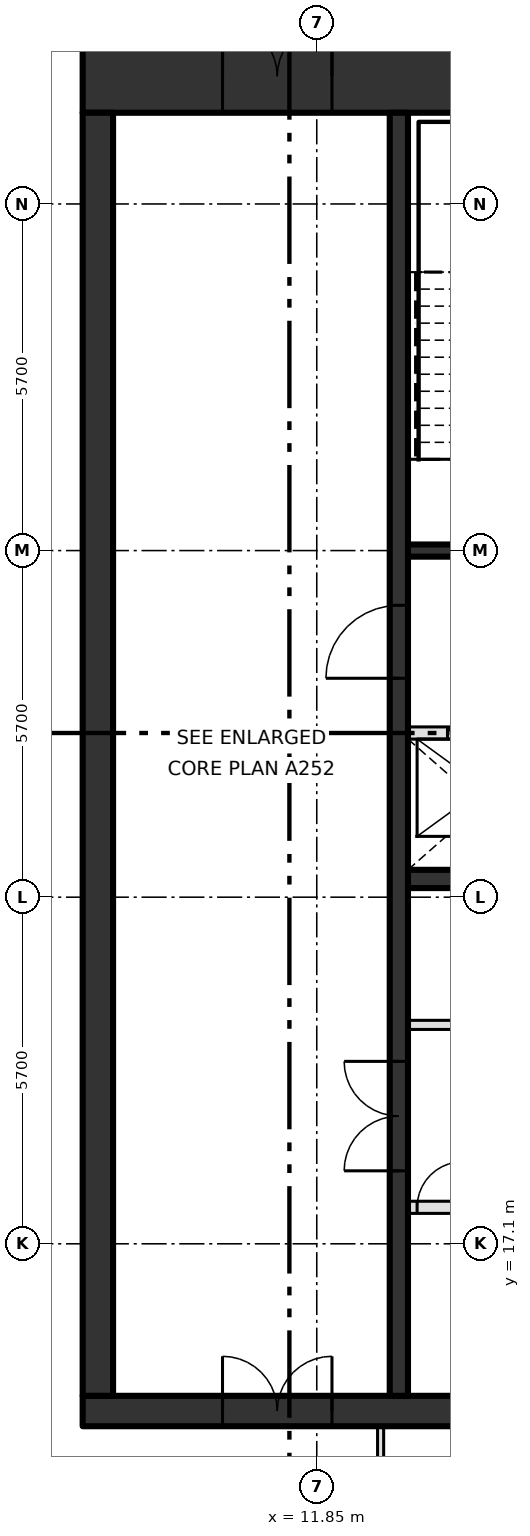
"""IFC4 building model, lengths in metres.
Left out: names, types, materials, properties, quantities, classifications, styles, units other than length and angle.
Written with IfcOpenShell. Run it as: python <this file> out.ifc"""

import sys

from ifc_helpers import new_model, si_unit, direction, frame, frame_2d, origin, place, context, subcontext, project, spatial, rectangle, extrude, element, fill, save


model = new_model("IFC4")
c1 = context("Model", 3, precision=1e-05, world=origin(), true_north=direction((0.0, 1.0)))
c2 = subcontext(c1, "Body", "Model", "MODEL_VIEW")
j1 = project(units=[si_unit("LENGTHUNIT", "METRE"), si_unit("PLANEANGLEUNIT", "RADIAN")], contexts=[c1])
p1 = place(None, origin())
s1 = spatial("IfcSite", under=j1, at=p1, CompositionType="ELEMENT")
p2 = place(p1, origin())
s2 = spatial("IfcBuilding", under=s1, at=p2, CompositionType="ELEMENT")
p3 = place(p2, frame((0.0, 0.0, 391.8)))
s3 = spatial("IfcBuildingStorey", under=s2, at=p3, CompositionType="ELEMENT", Elevation=391.8)
p4 = place(p3, frame((8.0, 14.35, -0.3), z_axis=(0.0, 0.0, 1.0), x_axis=(1.0, 0.0, 0.0)))
e1 = element("IfcWall", 1, at=p4, inside=s3, PredefinedType="SHEAR", context=c2, shape_type="SweptSolid", body=[
    extrude(rectangle(XDim=22.8, YDim=0.5, at=frame_2d((11.4, 0.0))), origin(), (0.0, 0.0, 1.0), 4.2),
])
p5 = place(p4, frame((2.3, 0.0, 0.3)))
e2 = element("IfcOpeningElement", 2, at=p5, cuts=e1, PredefinedType="OPENING", context=c2, shape_type="SweptSolid", body=[
    extrude(rectangle(XDim=1.8, YDim=2.1, at=frame_2d((0.9, 1.05))), frame((0.0, 0.26, 0.0), z_axis=(0.0, -1.0, 0.0), x_axis=(1.0, 0.0, 0.0)), (0.0, 0.0, 1.0), 0.52),
])
p6 = place(p3, frame((8.0, 36.3, -0.3), z_axis=(0.0, 0.0, 1.0), x_axis=(1.0, 0.0, 0.0)))
e3 = element("IfcWall", 3, at=p6, inside=s3, PredefinedType="SHEAR", context=c2, shape_type="SweptSolid", body=[
    extrude(rectangle(XDim=22.8, YDim=1.2, at=frame_2d((11.4, 0.0))), origin(), (0.0, 0.0, 1.0), 4.2),
])
p7 = place(p6, frame((2.3, 0.0, 0.3)))
e4 = element("IfcOpeningElement", 4, at=p7, cuts=e3, PredefinedType="OPENING", context=c2, shape_type="SweptSolid", body=[
    extrude(rectangle(XDim=1.8, YDim=2.1, at=frame_2d((0.9, 1.05))), frame((0.0, 0.61, 0.0), z_axis=(0.0, -1.0, 0.0), x_axis=(1.0, 0.0, 0.0)), (0.0, 0.0, 1.0), 1.22),
])
p8 = place(p3, frame((8.25, 14.6, -0.3), z_axis=(0.0, 0.0, 1.0), x_axis=(0.0, 1.0, 0.0)))
e5 = element("IfcWall", 5, at=p8, inside=s3, PredefinedType="SHEAR", context=c2, shape_type="SweptSolid", body=[
    extrude(rectangle(XDim=21.1, YDim=0.5, at=frame_2d((10.55, 0.0))), origin(), (0.0, 0.0, 1.0), 4.2),
])
p9 = place(p3, frame((13.35, 17.7, 0.0), z_axis=(0.0, 0.0, 1.0), x_axis=(1.0, 0.0, 0.0)))
e6 = element("IfcWall", 6, at=p9, inside=s3, PredefinedType="SOLIDWALL", context=c2, shape_type="SweptSolid", body=[
    extrude(rectangle(XDim=13.425, YDim=0.2, at=frame_2d((6.712, 0.0))), origin(), (0.0, 0.0, 1.0), 3.9),
])
p10 = place(p9, frame((2.0, 0.0, 0.0)))
e7 = element("IfcOpeningElement", 7, at=p10, cuts=e6, PredefinedType="OPENING", context=c2, shape_type="SweptSolid", body=[
    extrude(rectangle(XDim=1.1, YDim=2.1, at=frame_2d((0.55, 1.05))), frame((0.0, 0.11, 0.0), z_axis=(0.0, -1.0, 0.0), x_axis=(1.0, 0.0, 0.0)), (0.0, 0.0, 1.0), 0.22),
])
p11 = place(p9, frame((4.7, 0.0, 0.0)))
e8 = element("IfcOpeningElement", 8, at=p11, cuts=e6, PredefinedType="OPENING", context=c2, shape_type="SweptSolid", body=[
    extrude(rectangle(XDim=1.1, YDim=2.1, at=frame_2d((0.55, 1.05))), frame((0.0, 0.11, 0.0), z_axis=(0.0, -1.0, 0.0), x_axis=(1.0, 0.0, 0.0)), (0.0, 0.0, 1.0), 0.22),
])
p12 = place(p9, frame((7.4, 0.0, 0.0)))
e9 = element("IfcOpeningElement", 9, at=p12, cuts=e6, PredefinedType="OPENING", context=c2, shape_type="SweptSolid", body=[
    extrude(rectangle(XDim=1.1, YDim=2.1, at=frame_2d((0.55, 1.05))), frame((0.0, 0.11, 0.0), z_axis=(0.0, -1.0, 0.0), x_axis=(1.0, 0.0, 0.0)), (0.0, 0.0, 1.0), 0.22),
])
p13 = place(p9, frame((10.1, 0.0, 0.0)))
e10 = element("IfcOpeningElement", 10, at=p13, cuts=e6, PredefinedType="OPENING", context=c2, shape_type="SweptSolid", body=[
    extrude(rectangle(XDim=1.1, YDim=2.1, at=frame_2d((0.55, 1.05))), frame((0.0, 0.11, 0.0), z_axis=(0.0, -1.0, 0.0), x_axis=(1.0, 0.0, 0.0)), (0.0, 0.0, 1.0), 0.22),
])
p14 = place(p9, frame((0.15, 0.0, 0.0)))
e11 = element("IfcOpeningElement", 11, at=p14, cuts=e6, PredefinedType="OPENING", context=c2, shape_type="SweptSolid", body=[
    extrude(rectangle(XDim=0.75, YDim=2.1, at=frame_2d((0.375, 1.05))), frame((0.0, 0.11, 0.0), z_axis=(0.0, -1.0, 0.0), x_axis=(1.0, 0.0, 0.0)), (0.0, 0.0, 1.0), 0.22),
])
p15 = place(p9, frame((12.3, 0.0, 0.0)))
e12 = element("IfcOpeningElement", 12, at=p15, cuts=e6, PredefinedType="OPENING", context=c2, shape_type="SweptSolid", body=[
    extrude(rectangle(XDim=0.75, YDim=2.1, at=frame_2d((0.375, 1.05))), frame((0.0, 0.11, 0.0), z_axis=(0.0, -1.0, 0.0), x_axis=(1.0, 0.0, 0.0)), (0.0, 0.0, 1.0), 0.22),
])
p16 = place(p3, frame((13.35, 20.7, 0.0), z_axis=(0.0, 0.0, 1.0), x_axis=(1.0, 0.0, 0.0)))
e13 = element("IfcWall", 13, at=p16, inside=s3, PredefinedType="PARTITIONING", context=c2, shape_type="SweptSolid", body=[
    extrude(rectangle(XDim=13.425, YDim=0.15, at=frame_2d((6.712, 0.0))), origin(), (0.0, 0.0, 1.0), 3.9),
])
p17 = place(p16, frame((0.75, 0.0, 0.0)))
e14 = element("IfcOpeningElement", 14, at=p17, cuts=e13, PredefinedType="OPENING", context=c2, shape_type="SweptSolid", body=[
    extrude(rectangle(XDim=0.9, YDim=2.1, at=frame_2d((0.45, 1.05))), frame((0.0, 0.085, 0.0), z_axis=(0.0, -1.0, 0.0), x_axis=(1.0, 0.0, 0.0)), (0.0, 0.0, 1.0), 0.17),
])
p18 = place(p16, frame((7.5, 0.0, 0.0)))
e15 = element("IfcOpeningElement", 15, at=p18, cuts=e13, PredefinedType="OPENING", context=c2, shape_type="SweptSolid", body=[
    extrude(rectangle(XDim=0.9, YDim=2.1, at=frame_2d((0.45, 1.05))), frame((0.0, 0.085, 0.0), z_axis=(0.0, -1.0, 0.0), x_axis=(1.0, 0.0, 0.0)), (0.0, 0.0, 1.0), 0.17),
])
p19 = place(p3, frame((13.35, 23.1, 0.0), z_axis=(0.0, 0.0, 1.0), x_axis=(1.0, 0.0, 0.0)))
e16 = element("IfcWall", 16, at=p19, inside=s3, PredefinedType="SHEAR", context=c2, shape_type="SweptSolid", body=[
    extrude(rectangle(XDim=16.95, YDim=0.3, at=frame_2d((8.475, 0.0))), origin(), (0.0, 0.0, 1.0), 3.9),
])
p20 = place(p3, frame((13.35, 25.5, 0.0), z_axis=(0.0, 0.0, 1.0), x_axis=(1.0, 0.0, 0.0)))
e17 = element("IfcWall", 17, at=p20, inside=s3, PredefinedType="SOLIDWALL", context=c2, shape_type="SweptSolid", body=[
    extrude(rectangle(XDim=16.95, YDim=0.2, at=frame_2d((8.475, 0.0))), origin(), (0.0, 0.0, 1.0), 3.9),
])
p21 = place(p20, frame((0.65, 0.0, 0.0)))
e18 = element("IfcOpeningElement", 18, at=p21, cuts=e17, PredefinedType="OPENING", context=c2, shape_type="SweptSolid", body=[
    extrude(rectangle(XDim=1.1, YDim=2.1, at=frame_2d((0.55, 1.05))), frame((0.0, 0.11, 0.0), z_axis=(0.0, -1.0, 0.0), x_axis=(1.0, 0.0, 0.0)), (0.0, 0.0, 1.0), 0.22),
])
p22 = place(p20, frame((3.35, 0.0, 0.0)))
e19 = element("IfcOpeningElement", 19, at=p22, cuts=e17, PredefinedType="OPENING", context=c2, shape_type="SweptSolid", body=[
    extrude(rectangle(XDim=1.1, YDim=2.1, at=frame_2d((0.55, 1.05))), frame((0.0, 0.11, 0.0), z_axis=(0.0, -1.0, 0.0), x_axis=(1.0, 0.0, 0.0)), (0.0, 0.0, 1.0), 0.22),
])
p23 = place(p20, frame((6.05, 0.0, 0.0)))
e20 = element("IfcOpeningElement", 20, at=p23, cuts=e17, PredefinedType="OPENING", context=c2, shape_type="SweptSolid", body=[
    extrude(rectangle(XDim=1.1, YDim=2.1, at=frame_2d((0.55, 1.05))), frame((0.0, 0.11, 0.0), z_axis=(0.0, -1.0, 0.0), x_axis=(1.0, 0.0, 0.0)), (0.0, 0.0, 1.0), 0.22),
])
p24 = place(p20, frame((8.75, 0.0, 0.0)))
e21 = element("IfcOpeningElement", 21, at=p24, cuts=e17, PredefinedType="OPENING", context=c2, shape_type="SweptSolid", body=[
    extrude(rectangle(XDim=1.1, YDim=2.1, at=frame_2d((0.55, 1.05))), frame((0.0, 0.11, 0.0), z_axis=(0.0, -1.0, 0.0), x_axis=(1.0, 0.0, 0.0)), (0.0, 0.0, 1.0), 0.22),
])
p25 = place(p20, frame((13.0, 0.0, 0.0)))
e22 = element("IfcOpeningElement", 22, at=p25, cuts=e17, PredefinedType="OPENING", context=c2, shape_type="SweptSolid", body=[
    extrude(rectangle(XDim=0.9, YDim=2.1, at=frame_2d((0.45, 1.05))), frame((0.0, 0.11, 0.0), z_axis=(0.0, -1.0, 0.0), x_axis=(1.0, 0.0, 0.0)), (0.0, 0.0, 1.0), 0.22),
])
p26 = place(p3, frame((13.35, 28.5, 0.0), z_axis=(0.0, 0.0, 1.0), x_axis=(1.0, 0.0, 0.0)))
e23 = element("IfcWall", 23, at=p26, inside=s3, PredefinedType="SOLIDWALL", context=c2, shape_type="SweptSolid", body=[
    extrude(rectangle(XDim=6.75, YDim=0.2, at=frame_2d((3.375, 0.0))), origin(), (0.0, 0.0, 1.0), 3.9),
])
p27 = place(p26, frame((0.95, 0.0, 0.0)))
e24 = element("IfcOpeningElement", 24, at=p27, cuts=e23, PredefinedType="OPENING", context=c2, shape_type="SweptSolid", body=[
    extrude(rectangle(XDim=1.2, YDim=2.1, at=frame_2d((0.6, 1.05))), frame((0.0, 0.11, 0.0), z_axis=(0.0, -1.0, 0.0), x_axis=(1.0, 0.0, 0.0)), (0.0, 0.0, 1.0), 0.22),
])
p28 = place(p26, frame((3.75, 0.0, 0.0)))
e25 = element("IfcOpeningElement", 25, at=p28, cuts=e23, PredefinedType="OPENING", context=c2, shape_type="SweptSolid", body=[
    extrude(rectangle(XDim=1.1, YDim=2.1, at=frame_2d((0.55, 1.05))), frame((0.0, 0.11, 0.0), z_axis=(0.0, -1.0, 0.0), x_axis=(1.0, 0.0, 0.0)), (0.0, 0.0, 1.0), 0.22),
])
p29 = place(p3, frame((13.2, 14.6, 0.0), z_axis=(0.0, 0.0, 1.0), x_axis=(0.0, 1.0, 0.0)))
e26 = element("IfcWall", 26, at=p29, inside=s3, PredefinedType="SHEAR", context=c2, shape_type="SweptSolid", body=[
    extrude(rectangle(XDim=21.1, YDim=0.3, at=frame_2d((10.55, 0.0))), origin(), (0.0, 0.0, 1.0), 3.9),
])
p30 = place(p29, frame((3.7, 0.0, 0.0)))
e27 = element("IfcOpeningElement", 27, at=p30, cuts=e26, PredefinedType="OPENING", context=c2, shape_type="SweptSolid", body=[
    extrude(rectangle(XDim=1.8, YDim=2.1, at=frame_2d((0.9, 1.05))), frame((0.0, 0.16, 0.0), z_axis=(0.0, -1.0, 0.0), x_axis=(1.0, 0.0, 0.0)), (0.0, 0.0, 1.0), 0.32),
])
p31 = place(p29, frame((11.8, 0.0, 0.0)))
e28 = element("IfcOpeningElement", 28, at=p31, cuts=e26, PredefinedType="OPENING", context=c2, shape_type="SweptSolid", body=[
    extrude(rectangle(XDim=1.2, YDim=2.1, at=frame_2d((0.6, 1.05))), frame((0.0, 0.16, 0.0), z_axis=(0.0, -1.0, 0.0), x_axis=(1.0, 0.0, 0.0)), (0.0, 0.0, 1.0), 0.32),
])
p32 = place(p3, frame((12.9, 9.59, 0.0), z_axis=(0.0, 0.0, 1.0), x_axis=(0.0, 1.0, 0.0)))
e29 = element("IfcWall", 29, at=p32, inside=s3, PredefinedType="PARTITIONING", context=c2, shape_type="SweptSolid", body=[
    extrude(rectangle(XDim=4.51, YDim=0.1, at=frame_2d((2.255, 0.0))), origin(), (0.0, 0.0, 1.0), 3.9),
])
p33 = place(p21, origin())
e30 = element("IfcDoor", 30, at=p33, inside=s3, OperationType="SLIDING_TO_LEFT", PredefinedType="DOOR", context=c2, shape_type="SweptSolid", body=[
    extrude(rectangle(XDim=1.1, YDim=2.1, at=frame_2d((0.55, 1.05))), frame((0.0, 0.025, 0.0), z_axis=(0.0, -1.0, 0.0), x_axis=(1.0, 0.0, 0.0)), (0.0, 0.0, 1.0), 0.05),
])
fill(e18, e30)
p34 = place(p14, origin())
e31 = element("IfcDoor", 31, at=p34, inside=s3, OperationType="SINGLE_SWING_RIGHT", PredefinedType="DOOR", context=c2, shape_type="SweptSolid", body=[
    extrude(rectangle(XDim=0.75, YDim=2.1, at=frame_2d((0.375, 1.05))), frame((0.0, 0.025, 0.0), z_axis=(0.0, -1.0, 0.0), x_axis=(1.0, 0.0, 0.0)), (0.0, 0.0, 1.0), 0.05),
])
fill(e11, e31)
p35 = place(p30, origin())
e32 = element("IfcDoor", 32, at=p35, inside=s3, OperationType="DOUBLE_DOOR_SINGLE_SWING", PredefinedType="DOOR", context=c2, shape_type="SweptSolid", body=[
    extrude(rectangle(XDim=1.8, YDim=2.1, at=frame_2d((0.9, 1.05))), frame((0.0, 0.025, 0.0), z_axis=(0.0, -1.0, 0.0), x_axis=(1.0, 0.0, 0.0)), (0.0, 0.0, 1.0), 0.05),
])
fill(e27, e32)
p36 = place(p31, origin())
e33 = element("IfcDoor", 33, at=p36, inside=s3, OperationType="SINGLE_SWING_LEFT", PredefinedType="DOOR", context=c2, shape_type="SweptSolid", body=[
    extrude(rectangle(XDim=1.2, YDim=2.1, at=frame_2d((0.6, 1.05))), frame((0.0, 0.025, 0.0), z_axis=(0.0, -1.0, 0.0), x_axis=(1.0, 0.0, 0.0)), (0.0, 0.0, 1.0), 0.05),
])
fill(e28, e33)
p37 = place(p7, origin())
e34 = element("IfcDoor", 34, at=p37, inside=s3, OperationType="DOUBLE_DOOR_SINGLE_SWING", PredefinedType="DOOR", context=c2, shape_type="SweptSolid", body=[
    extrude(rectangle(XDim=1.8, YDim=2.1, at=frame_2d((0.9, 1.05))), frame((0.0, 0.025, 0.0), z_axis=(0.0, -1.0, 0.0), x_axis=(1.0, 0.0, 0.0)), (0.0, 0.0, 1.0), 0.05),
])
fill(e4, e34)
p38 = place(p5, origin())
e35 = element("IfcDoor", 35, at=p38, inside=s3, OperationType="DOUBLE_DOOR_SINGLE_SWING", PredefinedType="DOOR", context=c2, shape_type="SweptSolid", body=[
    extrude(rectangle(XDim=1.8, YDim=2.1, at=frame_2d((0.9, 1.05))), frame((0.0, 0.025, 0.0), z_axis=(0.0, -1.0, 0.0), x_axis=(1.0, 0.0, 0.0)), (0.0, 0.0, 1.0), 0.05),
])
fill(e2, e35)
save(model, sys.argv[1])
